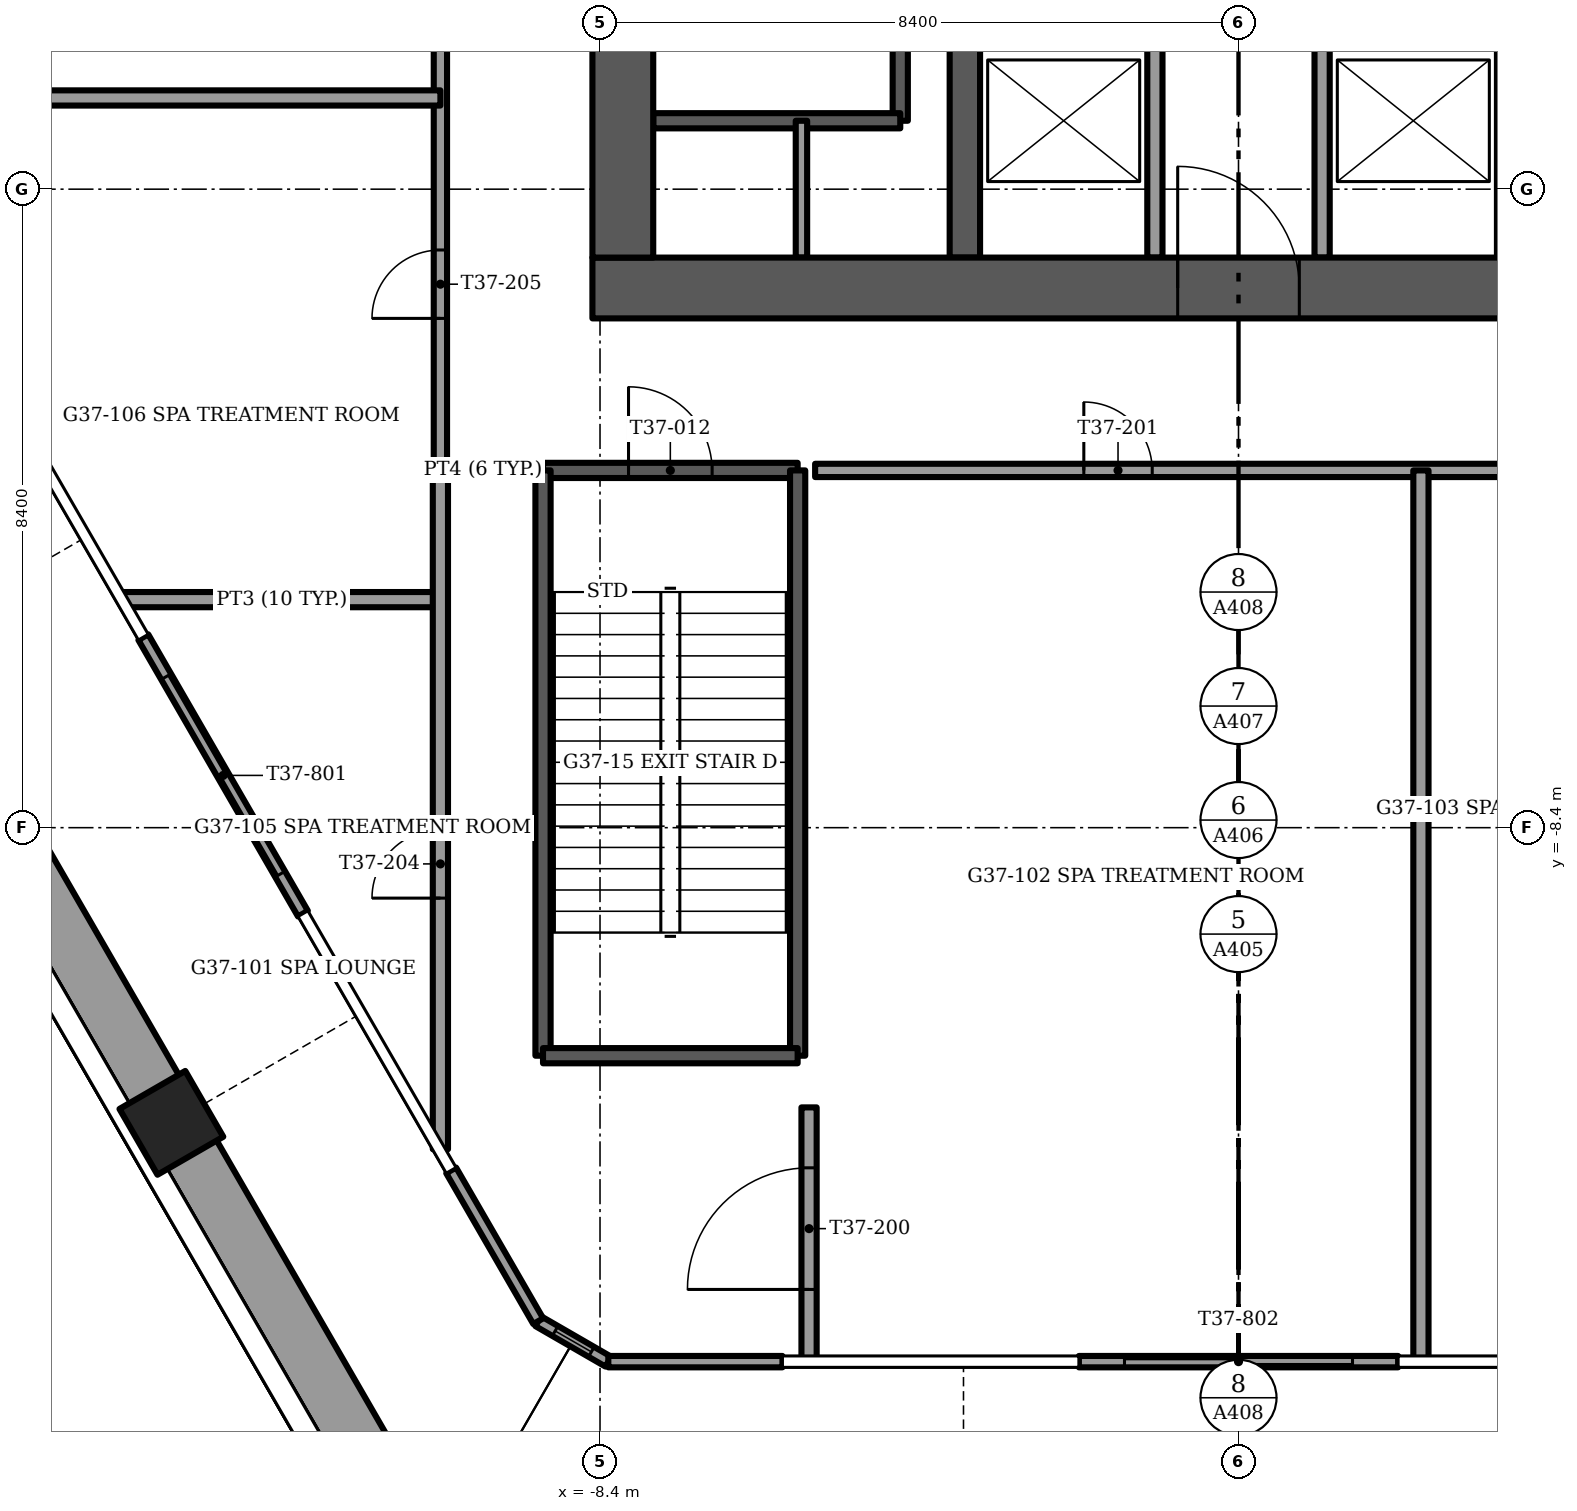
"""IFC4 building model, lengths in metres.
Left out: names, types, materials, properties, quantities, classifications, styles, units other than length and angle.
Written with IfcOpenShell. Run it as: python <this file> out.ifc"""

import sys

from ifc_helpers import new_model, si_unit, direction, frame, frame_2d, origin, origin_2d, place, context, subcontext, project, spatial, rectangle, extrude, element, fill, save


model = new_model("IFC4")
c1 = context("Model", 3, precision=1e-05, world=origin(), true_north=direction((0.0, 1.0)))
c2 = subcontext(c1, "Body", "Model", "MODEL_VIEW")
j1 = project(units=[si_unit("LENGTHUNIT", "METRE"), si_unit("PLANEANGLEUNIT", "RADIAN")], contexts=[c1])
p1 = place(None, origin())
s1 = spatial("IfcSite", under=j1, at=p1, CompositionType="ELEMENT")
p2 = place(p1, origin())
s2 = spatial("IfcBuilding", under=s1, at=p2, CompositionType="ELEMENT")
p3 = place(p2, frame((0.0, 0.0, 151.0)))
s3 = spatial("IfcBuildingStorey", under=s2, at=p3, CompositionType="ELEMENT", Elevation=151.0)
p4 = place(p3, frame((-14.039, -12.283, -1.2), z_axis=(0.0, 0.0, 1.0), x_axis=(-0.5, 0.866025403784, 0.0)))
e1 = element("IfcColumn", 1, at=p4, inside=s3, PredefinedType="COLUMN", context=c2, shape_type="SweptSolid", body=[
    extrude(rectangle(XDim=1.0, YDim=1.0, at=origin_2d()), origin(), (0.0, 0.0, 1.0), 6.0),
])
p5 = place(p3, frame((-8.5, -1.3, -0.3), z_axis=(0.0, 0.0, 1.0), x_axis=(1.0, 0.0, 0.0)))
e2 = element("IfcWall", 2, at=p5, inside=s3, PredefinedType="SHEAR", context=c2, shape_type="SweptSolid", body=[
    extrude(rectangle(XDim=17.0, YDim=0.8, at=frame_2d((8.5, 0.0))), origin(), (0.0, 0.0, 1.0), 6.0),
])
p6 = place(p5, frame((7.7, 0.0, 0.0)))
e3 = element("IfcOpeningElement", 3, at=p6, cuts=e2, PredefinedType="OPENING", context=c2, shape_type="SweptSolid", body=[
    extrude(rectangle(XDim=1.6, YDim=2.1, at=frame_2d((0.8, 1.05))), frame((0.0, 0.4, 0.0), z_axis=(0.0, -1.0, 0.0), x_axis=(1.0, 0.0, 0.0)), (0.0, 0.0, 1.0), 0.8),
])
p7 = place(p3, frame((-8.1, -0.9, -0.3), z_axis=(0.0, 0.0, 1.0), x_axis=(0.0, 1.0, 0.0)))
e4 = element("IfcWall", 4, at=p7, inside=s3, PredefinedType="SHEAR", context=c2, shape_type="SweptSolid", body=[
    extrude(rectangle(XDim=9.8, YDim=0.8, at=frame_2d((4.9, 0.0))), origin(), (0.0, 0.0, 1.0), 6.0),
])
p8 = place(p7, frame((8.15, 0.0, 0.0)))
e5 = element("IfcOpeningElement", 5, at=p8, cuts=e4, PredefinedType="OPENING", context=c2, shape_type="SweptSolid", body=[
    extrude(rectangle(XDim=1.1, YDim=2.1, at=frame_2d((0.55, 1.05))), frame((0.0, 0.4, 0.0), z_axis=(0.0, -1.0, 0.0), x_axis=(1.0, 0.0, 0.0)), (0.0, 0.0, 1.0), 0.8),
])
p9 = place(p3, frame((-3.6, -0.9, -0.3), z_axis=(0.0, 0.0, 1.0), x_axis=(0.0, 1.0, 0.0)))
e6 = element("IfcWall", 6, at=p9, inside=s3, PredefinedType="SHEAR", context=c2, shape_type="SweptSolid", body=[
    extrude(rectangle(XDim=9.8, YDim=0.4, at=frame_2d((4.9, 0.0))), origin(), (0.0, 0.0, 1.0), 6.0),
])
p10 = place(p3, frame((-17.466, -6.449, 0.0), z_axis=(0.0, 0.0, 1.0), x_axis=(0.500013351051, -0.866017695414, 0.0)))
e7 = element("IfcWall", 7, at=p10, inside=s3, PredefinedType="PARAPET", context=c2, shape_type="SweptSolid", body=[
    extrude(rectangle(XDim=6.296, YDim=0.9, at=frame_2d((3.148, 0.0))), origin(), (0.0, 0.0, 1.0), 1.1),
])
p11 = place(p3, frame((-13.847, -12.715, 0.0), z_axis=(0.0, 0.0, 1.0), x_axis=(0.49998703478, -0.866032889128, 0.0)))
e8 = element("IfcWall", 8, at=p11, inside=s3, PredefinedType="PARAPET", context=c2, shape_type="SweptSolid", body=[
    extrude(rectangle(XDim=5.964, YDim=0.9, at=frame_2d((2.982, 0.0))), origin(), (0.0, 0.0, 1.0), 1.1),
])
p12 = place(p3, frame((-15.308, 4.335, 0.0), z_axis=(0.0, 0.0, 1.0), x_axis=(-0.500032091566, -0.866006874918, 0.0)))
e9 = element("IfcWall", 9, at=p12, inside=s3, PredefinedType="SOLIDWALL", context=c2, shape_type="SweptSolid", body=[
    extrude(rectangle(XDim=4.391, YDim=0.15, at=frame_2d((2.195, 0.0))), origin(), (0.0, 0.0, 1.0), 5.7),
])
p13 = place(p3, frame((-14.408, -5.894, 0.0), z_axis=(0.0, 0.0, 1.0), x_axis=(0.500002543286, -0.866023935413, 0.0)))
e10 = element("IfcWall", 10, at=p13, inside=s3, PredefinedType="SOLIDWALL", context=c2, shape_type="SweptSolid", body=[
    extrude(rectangle(XDim=4.2, YDim=0.15, at=frame_2d((2.1, 0.0))), origin(), (0.0, 0.0, 1.0), 5.7),
])
p14 = place(p13, frame((0.6, 0.0, 0.0)))
e11 = element("IfcOpeningElement", 11, at=p14, cuts=e10, PredefinedType="OPENING", context=c2, shape_type="SweptSolid", body=[
    extrude(rectangle(XDim=3.0, YDim=2.4, at=frame_2d((1.5, 1.2))), frame((0.0, 0.075, 0.0), z_axis=(0.0, -1.0, 0.0), x_axis=(1.0, 0.0, 0.0)), (0.0, 0.0, 1.0), 0.15),
])
p15 = place(p3, frame((-10.358, -12.909, 0.0), z_axis=(0.0, 0.0, 1.0), x_axis=(0.499956172933, -0.866050705875, 0.0)))
e12 = element("IfcWall", 12, at=p15, inside=s3, PredefinedType="SOLIDWALL", context=c2, shape_type="SweptSolid", body=[
    extrude(rectangle(XDim=2.291, YDim=0.15, at=frame_2d((1.146, 0.0))), origin(), (0.0, 0.0, 1.0), 5.7),
])
p16 = place(p3, frame((-2.1, -15.425, 0.0), z_axis=(0.0, 0.0, 1.0), x_axis=(1.0, 0.0, 0.0)))
e13 = element("IfcWall", 13, at=p16, inside=s3, PredefinedType="SOLIDWALL", context=c2, shape_type="SweptSolid", body=[
    extrude(rectangle(XDim=4.2, YDim=0.15, at=frame_2d((2.1, 0.0))), origin(), (0.0, 0.0, 1.0), 5.7),
])
p17 = place(p16, frame((0.6, 0.0, 0.0)))
e14 = element("IfcOpeningElement", 14, at=p17, cuts=e13, PredefinedType="OPENING", context=c2, shape_type="SweptSolid", body=[
    extrude(rectangle(XDim=3.0, YDim=2.4, at=frame_2d((1.5, 1.2))), frame((0.0, 0.075, 0.0), z_axis=(0.0, -1.0, 0.0), x_axis=(1.0, 0.0, 0.0)), (0.0, 0.0, 1.0), 0.15),
])
p18 = place(p3, frame((-8.291, -15.425, 0.0), z_axis=(0.0, 0.0, 1.0), x_axis=(1.0, 0.0, 0.0)))
e15 = element("IfcWall", 15, at=p18, inside=s3, PredefinedType="SOLIDWALL", context=c2, shape_type="SweptSolid", body=[
    extrude(rectangle(XDim=2.291, YDim=0.15, at=frame_2d((1.146, 0.0))), origin(), (0.0, 0.0, 1.0), 5.7),
])
p19 = place(p3, frame((-9.213, -14.893, 0.0), z_axis=(0.0, 0.0, 1.0), x_axis=(0.866048165231, -0.499960573946, 0.0)))
e16 = element("IfcWall", 16, at=p19, inside=s3, PredefinedType="SOLIDWALL", context=c2, shape_type="SweptSolid", body=[
    extrude(rectangle(XDim=1.065, YDim=0.15, at=frame_2d((0.532, 0.0))), origin(), (0.0, 0.0, 1.0), 5.7),
])
p20 = place(p19, frame((0.258, 0.0, 0.15)))
e17 = element("IfcOpeningElement", 17, at=p20, cuts=e16, PredefinedType="OPENING", context=c2, shape_type="SweptSolid", body=[
    extrude(rectangle(XDim=0.55, YDim=5.1, at=frame_2d((0.275, 2.55))), frame((0.0, 0.075, 0.0), z_axis=(0.0, -1.0, 0.0), x_axis=(1.0, 0.0, 0.0)), (0.0, 0.0, 1.0), 0.15),
])
for number, where, z_axis, x_axis in (
    (18, (-1.1, -0.9, 0.0), (0.0, 0.0, 1.0), (0.0, 1.0, 0.0)),
    (19, (1.1, -0.9, 0.0), (0.0, 0.0, 1.0), (0.0, 1.0, 0.0)),
):
    element("IfcWall", number, at=place(p3, frame(where, z_axis=z_axis, x_axis=x_axis)), inside=s3, PredefinedType="PARTITIONING", context=c2, shape_type="SweptSolid", body=[
        extrude(rectangle(XDim=2.9, YDim=0.2, at=frame_2d((1.45, 0.0))), origin(), (0.0, 0.0, 1.0), 5.7),
    ])
p21 = place(p3, frame((-4.45, 0.9, -0.3), z_axis=(0.0, 0.0, 1.0), x_axis=(0.0, 1.0, 0.0)))
e20 = element("IfcWall", 20, at=p21, inside=s3, PredefinedType="SOLIDWALL", context=c2, shape_type="SweptSolid", body=[
    extrude(rectangle(XDim=8.0, YDim=0.2, at=frame_2d((4.0, 0.0))), origin(), (0.0, 0.0, 1.0), 6.0),
])
p22 = place(p3, frame((-7.7, 0.9, -0.3), z_axis=(0.0, 0.0, 1.0), x_axis=(1.0, 0.0, 0.0)))
e21 = element("IfcWall", 21, at=p22, inside=s3, PredefinedType="SOLIDWALL", context=c2, shape_type="SweptSolid", body=[
    extrude(rectangle(XDim=3.25, YDim=0.2, at=frame_2d((1.625, 0.0))), origin(), (0.0, 0.0, 1.0), 6.0),
])
p23 = place(p3, frame((-5.75, -0.9, 0.0), z_axis=(0.0, 0.0, 1.0), x_axis=(0.0, 1.0, 0.0)))
e22 = element("IfcWall", 22, at=p23, inside=s3, PredefinedType="PARTITIONING", context=c2, shape_type="SweptSolid", body=[
    extrude(rectangle(XDim=1.8, YDim=0.15, at=frame_2d((0.9, 0.0))), origin(), (0.0, 0.0, 1.0), 5.7),
])
p24 = place(p3, frame((-9.15, -3.7, -0.3), z_axis=(0.0, 0.0, 1.0), x_axis=(1.0, 0.0, 0.0)))
e23 = element("IfcWall", 23, at=p24, inside=s3, PredefinedType="SOLIDWALL", context=c2, shape_type="SweptSolid", body=[
    extrude(rectangle(XDim=3.35, YDim=0.2, at=frame_2d((1.675, 0.0))), origin(), (0.0, 0.0, 1.0), 6.0),
])
p25 = place(p24, frame((1.125, 0.0, 0.0)))
e24 = element("IfcOpeningElement", 24, at=p25, cuts=e23, PredefinedType="OPENING", context=c2, shape_type="SweptSolid", body=[
    extrude(rectangle(XDim=1.1, YDim=2.1, at=frame_2d((0.55, 1.05))), frame((0.0, 0.1, 0.0), z_axis=(0.0, -1.0, 0.0), x_axis=(1.0, 0.0, 0.0)), (0.0, 0.0, 1.0), 0.2),
])
for number, where, z_axis, x_axis in (
    (25, (-9.15, -3.7, -0.3), (0.0, 0.0, 1.0), (0.0, -1.0, 0.0)),
    (26, (-5.8, -3.7, -0.3), (0.0, 0.0, 1.0), (0.0, -1.0, 0.0)),
):
    element("IfcWall", number, at=place(p3, frame(where, z_axis=z_axis, x_axis=x_axis)), inside=s3, PredefinedType="SOLIDWALL", context=c2, shape_type="SweptSolid", body=[
        extrude(rectangle(XDim=7.7, YDim=0.2, at=frame_2d((3.85, 0.0))), origin(), (0.0, 0.0, 1.0), 6.0),
    ])
p26 = place(p3, frame((-9.15, -11.4, -0.3), z_axis=(0.0, 0.0, 1.0), x_axis=(1.0, 0.0, 0.0)))
e27 = element("IfcWall", 27, at=p26, inside=s3, PredefinedType="SOLIDWALL", context=c2, shape_type="SweptSolid", body=[
    extrude(rectangle(XDim=3.35, YDim=0.2, at=frame_2d((1.675, 0.0))), origin(), (0.0, 0.0, 1.0), 6.0),
])
p27 = place(p3, frame((-10.5, -3.7, 0.0), z_axis=(0.0, 0.0, 1.0), x_axis=(1.0, 0.0, 0.0)))
e28 = element("IfcWall", 28, at=p27, inside=s3, PredefinedType="PARTITIONING", context=c2, shape_type="SweptSolid", body=[
    extrude(rectangle(XDim=1.12, YDim=0.175, at=frame_2d((0.56, 0.0))), origin(), (0.0, 0.0, 1.0), 5.7),
])
p28 = place(p3, frame((-5.57, -3.7, 0.0), z_axis=(0.0, 0.0, 1.0), x_axis=(1.0, 0.0, 0.0)))
e29 = element("IfcWall", 29, at=p28, inside=s3, PredefinedType="PARTITIONING", context=c2, shape_type="SweptSolid", body=[
    extrude(rectangle(XDim=11.14, YDim=0.175, at=frame_2d((5.57, 0.0))), origin(), (0.0, 0.0, 1.0), 5.7),
])
p29 = place(p28, frame((3.535, 0.0, 0.0)))
e30 = element("IfcOpeningElement", 30, at=p29, cuts=e29, PredefinedType="OPENING", context=c2, shape_type="SweptSolid", body=[
    extrude(rectangle(XDim=0.9, YDim=2.1, at=frame_2d((0.45, 1.05))), frame((0.0, 0.087, 0.0), z_axis=(0.0, -1.0, 0.0), x_axis=(1.0, 0.0, 0.0)), (0.0, 0.0, 1.0), 0.175),
])
p30 = place(p28, frame((9.105, 0.0, 0.0)))
e31 = element("IfcOpeningElement", 31, at=p30, cuts=e29, PredefinedType="OPENING", context=c2, shape_type="SweptSolid", body=[
    extrude(rectangle(XDim=0.9, YDim=2.1, at=frame_2d((0.45, 1.05))), frame((0.0, 0.087, 0.0), z_axis=(0.0, -1.0, 0.0), x_axis=(1.0, 0.0, 0.0)), (0.0, 0.0, 1.0), 0.175),
])
p31 = place(p3, frame((-10.5, -3.7, 0.0), z_axis=(0.0, 0.0, 1.0), x_axis=(0.0, 1.0, 0.0)))
e32 = element("IfcWall", 32, at=p31, inside=s3, PredefinedType="PARTITIONING", context=c2, shape_type="SweptSolid", body=[
    extrude(rectangle(XDim=16.33, YDim=0.175, at=frame_2d((8.165, 0.0))), origin(), (0.0, 0.0, 1.0), 5.7),
])
p32 = place(p31, frame((2.0, 0.0, 0.0)))
e33 = element("IfcOpeningElement", 33, at=p32, cuts=e32, PredefinedType="OPENING", context=c2, shape_type="SweptSolid", body=[
    extrude(rectangle(XDim=0.9, YDim=2.1, at=frame_2d((0.45, 1.05))), frame((0.0, 0.087, 0.0), z_axis=(0.0, -1.0, 0.0), x_axis=(1.0, 0.0, 0.0)), (0.0, 0.0, 1.0), 0.175),
])
p33 = place(p31, frame((9.35, 0.0, 0.0)))
e34 = element("IfcOpeningElement", 34, at=p33, cuts=e32, PredefinedType="OPENING", context=c2, shape_type="SweptSolid", body=[
    extrude(rectangle(XDim=1.6, YDim=2.1, at=frame_2d((0.8, 1.05))), frame((0.0, 0.087, 0.0), z_axis=(0.0, -1.0, 0.0), x_axis=(1.0, 0.0, 0.0)), (0.0, 0.0, 1.0), 0.175),
])
p34 = place(p3, frame((-14.672, -5.4, 0.0), z_axis=(0.0, 0.0, 1.0), x_axis=(1.0, 0.0, 0.0)))
e35 = element("IfcWall", 35, at=p34, inside=s3, PredefinedType="PARTITIONING", context=c2, shape_type="SweptSolid", body=[
    extrude(rectangle(XDim=4.172, YDim=0.2, at=frame_2d((2.086, 0.0))), origin(), (0.0, 0.0, 1.0), 5.7),
])
p35 = place(p3, frame((-17.027, 1.2, 0.0), z_axis=(0.0, 0.0, 1.0), x_axis=(1.0, 0.0, 0.0)))
e36 = element("IfcWall", 36, at=p35, inside=s3, PredefinedType="PARTITIONING", context=c2, shape_type="SweptSolid", body=[
    extrude(rectangle(XDim=6.527, YDim=0.2, at=frame_2d((3.263, 0.0))), origin(), (0.0, 0.0, 1.0), 5.7),
])
p36 = place(p3, frame((-10.5, -12.63, 0.0), z_axis=(0.0, 0.0, 1.0), x_axis=(0.0, 1.0, 0.0)))
e37 = element("IfcWall", 37, at=p36, inside=s3, PredefinedType="PARTITIONING", context=c2, shape_type="SweptSolid", body=[
    extrude(rectangle(XDim=8.93, YDim=0.2, at=frame_2d((4.465, 0.0))), origin(), (0.0, 0.0, 1.0), 5.7),
])
p37 = place(p36, frame((3.304, 0.0, 0.0)))
e38 = element("IfcOpeningElement", 38, at=p37, cuts=e37, PredefinedType="OPENING", context=c2, shape_type="SweptSolid", body=[
    extrude(rectangle(XDim=0.9, YDim=2.1, at=frame_2d((0.45, 1.05))), frame((0.0, 0.1, 0.0), z_axis=(0.0, -1.0, 0.0), x_axis=(1.0, 0.0, 0.0)), (0.0, 0.0, 1.0), 0.2),
])
p38 = place(p3, frame((-5.65, -15.406, 0.0), z_axis=(0.0, 0.0, 1.0), x_axis=(0.0, 1.0, 0.0)))
e39 = element("IfcWall", 39, at=p38, inside=s3, PredefinedType="PARTITIONING", context=c2, shape_type="SweptSolid", body=[
    extrude(rectangle(XDim=3.326, YDim=0.2, at=frame_2d((1.663, 0.0))), origin(), (0.0, 0.0, 1.0), 5.7),
])
p39 = place(p38, frame((0.931, 0.0, 0.0)))
e40 = element("IfcOpeningElement", 40, at=p39, cuts=e39, PredefinedType="OPENING", context=c2, shape_type="SweptSolid", body=[
    extrude(rectangle(XDim=1.6, YDim=2.1, at=frame_2d((0.8, 1.05))), frame((0.0, 0.1, 0.0), z_axis=(0.0, -1.0, 0.0), x_axis=(1.0, 0.0, 0.0)), (0.0, 0.0, 1.0), 0.2),
])
p40 = place(p3, frame((2.4, -15.406, 0.0), z_axis=(0.0, 0.0, 1.0), x_axis=(0.0, 1.0, 0.0)))
e41 = element("IfcWall", 41, at=p40, inside=s3, PredefinedType="PARTITIONING", context=c2, shape_type="SweptSolid", body=[
    extrude(rectangle(XDim=11.706, YDim=0.2, at=frame_2d((5.853, 0.0))), origin(), (0.0, 0.0, 1.0), 5.7),
])
p41 = place(p14, origin())
e42 = element("IfcDoor", 42, at=p41, inside=s3, OperationType="SLIDING_TO_RIGHT", PredefinedType="DOOR", context=c2, shape_type="SweptSolid", body=[
    extrude(rectangle(XDim=3.0, YDim=2.4, at=frame_2d((1.5, 1.2))), frame((0.0, 0.025, 0.0), z_axis=(0.0, -1.0, 0.0), x_axis=(1.0, 0.0, 0.0)), (0.0, 0.0, 1.0), 0.05),
])
fill(e11, e42)
p42 = place(p17, origin())
e43 = element("IfcDoor", 43, at=p42, inside=s3, OperationType="SLIDING_TO_RIGHT", PredefinedType="DOOR", context=c2, shape_type="SweptSolid", body=[
    extrude(rectangle(XDim=3.0, YDim=2.4, at=frame_2d((1.5, 1.2))), frame((0.0, 0.025, 0.0), z_axis=(0.0, -1.0, 0.0), x_axis=(1.0, 0.0, 0.0)), (0.0, 0.0, 1.0), 0.05),
])
fill(e14, e43)
p43 = place(p20, origin())
e44 = element("IfcWindow", 44, at=p43, inside=s3, PartitioningType="SINGLE_PANEL", PredefinedType="WINDOW", context=c2, shape_type="SweptSolid", body=[
    extrude(rectangle(XDim=0.55, YDim=5.1, at=frame_2d((0.275, 2.55))), frame((0.0, 0.03, 0.0), z_axis=(0.0, -1.0, 0.0), x_axis=(1.0, 0.0, 0.0)), (0.0, 0.0, 1.0), 0.06),
])
fill(e17, e44)
p44 = place(p6, origin())
e45 = element("IfcDoor", 45, at=p44, inside=s3, OperationType="DOUBLE_DOOR_SINGLE_SWING", PredefinedType="DOOR", context=c2, shape_type="SweptSolid", body=[
    extrude(rectangle(XDim=1.6, YDim=2.1, at=frame_2d((0.8, 1.05))), frame((0.0, 0.025, 0.0), z_axis=(0.0, -1.0, 0.0), x_axis=(1.0, 0.0, 0.0)), (0.0, 0.0, 1.0), 0.05),
])
fill(e3, e45)
p45 = place(p25, origin())
e46 = element("IfcDoor", 46, at=p45, inside=s3, OperationType="SINGLE_SWING_LEFT", PredefinedType="DOOR", context=c2, shape_type="SweptSolid", body=[
    extrude(rectangle(XDim=1.1, YDim=2.1, at=frame_2d((0.55, 1.05))), frame((0.0, 0.025, 0.0), z_axis=(0.0, -1.0, 0.0), x_axis=(1.0, 0.0, 0.0)), (0.0, 0.0, 1.0), 0.05),
])
fill(e24, e46)
p46 = place(p39, origin())
e47 = element("IfcDoor", 47, at=p46, inside=s3, OperationType="DOUBLE_DOOR_SINGLE_SWING", PredefinedType="DOOR", context=c2, shape_type="SweptSolid", body=[
    extrude(rectangle(XDim=1.6, YDim=2.1, at=frame_2d((0.8, 1.05))), frame((0.0, 0.025, 0.0), z_axis=(0.0, -1.0, 0.0), x_axis=(1.0, 0.0, 0.0)), (0.0, 0.0, 1.0), 0.05),
])
fill(e40, e47)
p47 = place(p29, origin())
e48 = element("IfcDoor", 48, at=p47, inside=s3, OperationType="SINGLE_SWING_LEFT", PredefinedType="DOOR", context=c2, shape_type="SweptSolid", body=[
    extrude(rectangle(XDim=0.9, YDim=2.1, at=frame_2d((0.45, 1.05))), frame((0.0, 0.025, 0.0), z_axis=(0.0, -1.0, 0.0), x_axis=(1.0, 0.0, 0.0)), (0.0, 0.0, 1.0), 0.05),
])
fill(e30, e48)
p48 = place(p37, origin())
e49 = element("IfcDoor", 49, at=p48, inside=s3, OperationType="SINGLE_SWING_RIGHT", PredefinedType="DOOR", context=c2, shape_type="SweptSolid", body=[
    extrude(rectangle(XDim=0.9, YDim=2.1, at=frame_2d((0.45, 1.05))), frame((0.0, 0.025, 0.0), z_axis=(0.0, -1.0, 0.0), x_axis=(1.0, 0.0, 0.0)), (0.0, 0.0, 1.0), 0.05),
])
fill(e38, e49)
p49 = place(p32, origin())
e50 = element("IfcDoor", 50, at=p49, inside=s3, OperationType="SINGLE_SWING_LEFT", PredefinedType="DOOR", context=c2, shape_type="SweptSolid", body=[
    extrude(rectangle(XDim=0.9, YDim=2.1, at=frame_2d((0.45, 1.05))), frame((0.0, 0.025, 0.0), z_axis=(0.0, -1.0, 0.0), x_axis=(1.0, 0.0, 0.0)), (0.0, 0.0, 1.0), 0.05),
])
fill(e33, e50)
save(model, sys.argv[1])
